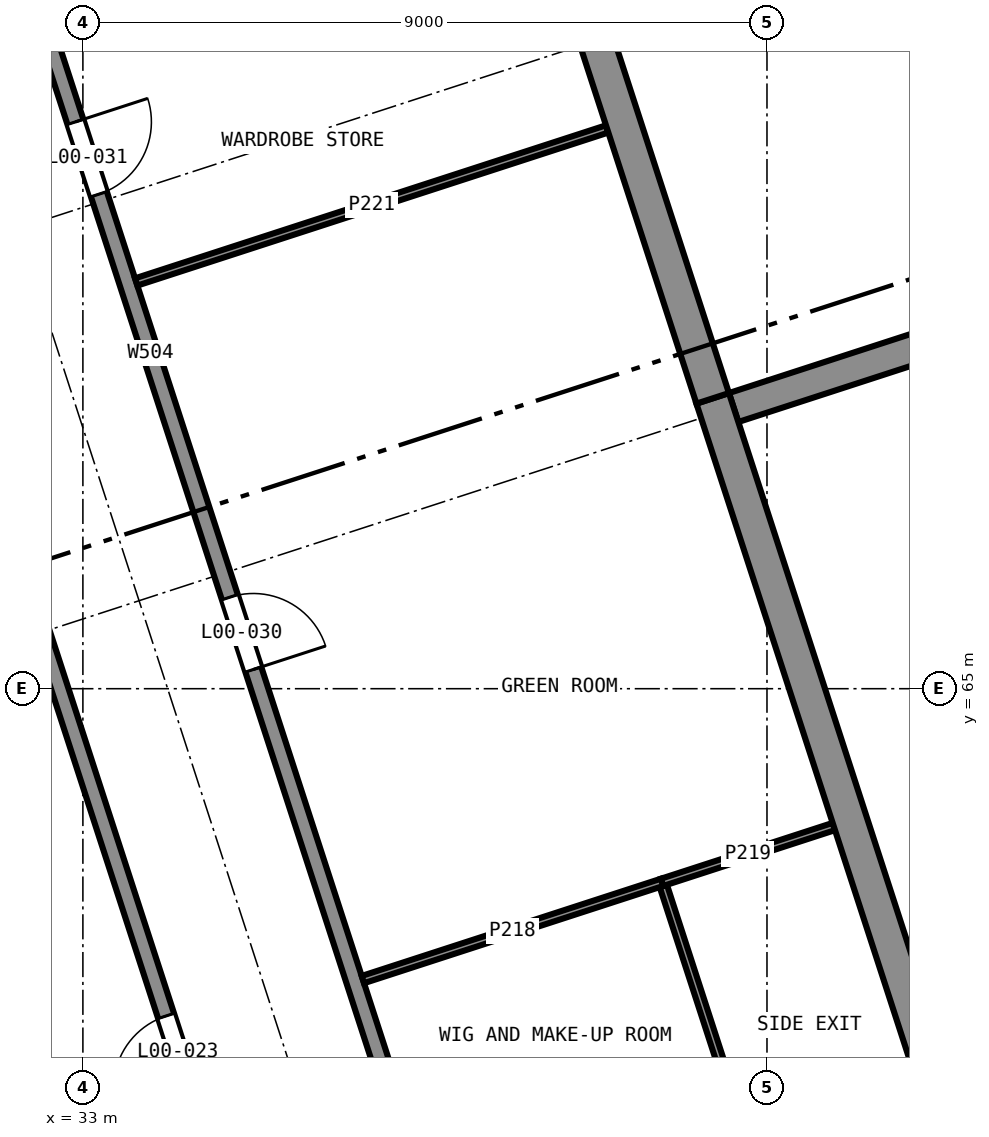
"""IFC4 building model, lengths in metres.
Left out: names, types, materials, properties, quantities, classifications, styles, units other than length and angle.
Written with IfcOpenShell. Run it as: python <this file> out.ifc"""

import sys

from ifc_helpers import new_model, si_unit, direction, frame, frame_2d, origin, place, context, subcontext, project, spatial, rectangle, extrude, element, fill, save


model = new_model("IFC4")
c1 = context("Model", 3, precision=1e-05, world=origin(), true_north=direction((0.0, 1.0)))
c2 = subcontext(c1, "Body", "Model", "MODEL_VIEW")
j1 = project(units=[si_unit("LENGTHUNIT", "METRE"), si_unit("PLANEANGLEUNIT", "RADIAN")], contexts=[c1])
p1 = place(None, origin())
s1 = spatial("IfcSite", under=j1, at=p1, CompositionType="ELEMENT")
p2 = place(p1, origin())
s2 = spatial("IfcBuilding", under=s1, at=p2, CompositionType="ELEMENT")
p3 = place(p2, origin())
s3 = spatial("IfcBuildingStorey", under=s2, at=p3, CompositionType="ELEMENT", Elevation=0.0)
p4 = place(p3, frame((49.93, 42.214, 0.0), z_axis=(0.0, 0.0, 1.0), x_axis=(-0.309016215614, 0.95105676933, 0.0)))
e1 = element("IfcWall", 1, at=p4, inside=s3, PredefinedType="SHEAR", context=c2, shape_type="SweptSolid", body=[
    extrude(rectangle(XDim=27.975, YDim=0.45, at=frame_2d((13.988, 0.0))), origin(), (0.0, 0.0, 1.0), 5.5),
])
p5 = place(p4, frame((13.775, 0.0, 0.0)))
e2 = element("IfcOpeningElement", 2, at=p5, cuts=e1, PredefinedType="OPENING", context=c2, shape_type="SweptSolid", body=[
    extrude(rectangle(XDim=2.0, YDim=2.4, at=frame_2d((1.0, 1.2))), frame((0.0, 0.235, 0.0), z_axis=(0.0, -1.0, 0.0), x_axis=(1.0, 0.0, 0.0)), (0.0, 0.0, 1.0), 0.47),
])
p6 = place(p3, frame((41.286, 68.82, 0.0), z_axis=(0.0, 0.0, 1.0), x_axis=(-0.309008517326, 0.951059270613, 0.0)))
e3 = element("IfcWall", 3, at=p6, inside=s3, PredefinedType="SHEAR", context=c2, shape_type="SweptSolid", body=[
    extrude(rectangle(XDim=19.575, YDim=0.45, at=frame_2d((9.788, 0.0))), origin(), (0.0, 0.0, 1.0), 5.5),
])
p7 = place(p6, frame((7.4, 0.0, 0.0)))
e4 = element("IfcOpeningElement", 4, at=p7, cuts=e3, PredefinedType="OPENING", context=c2, shape_type="SweptSolid", body=[
    extrude(rectangle(XDim=4.8, YDim=4.5, at=frame_2d((2.4, 2.25))), frame((0.0, 0.235, 0.0), z_axis=(0.0, -1.0, 0.0), x_axis=(1.0, 0.0, 0.0)), (0.0, 0.0, 1.0), 0.47),
])
p8 = place(p3, frame((41.562, 68.699, 0.0), z_axis=(0.0, 0.0, 1.0), x_axis=(0.95105806443, 0.309012229664, 0.0)))
e5 = element("IfcWall", 5, at=p8, inside=s3, PredefinedType="SHEAR", context=c2, shape_type="SweptSolid", body=[
    extrude(rectangle(XDim=7.775, YDim=0.4, at=frame_2d((3.888, 0.0))), origin(), (0.0, 0.0, 1.0), 5.5),
])
p9 = place(p3, frame((33.501, 41.003, 0.0), z_axis=(0.0, 0.0, 1.0), x_axis=(-0.309017194826, 0.951056451165, 0.0)))
e6 = element("IfcWall", 6, at=p9, inside=s3, PredefinedType="SOLIDWALL", context=c2, shape_type="SweptSolid", body=[
    extrude(rectangle(XDim=53.7, YDim=0.3, at=frame_2d((26.85, 0.0))), origin(), (0.0, 0.0, 1.0), 5.5),
])
p10 = place(p9, frame((31.55, 0.0, 0.9)))
e7 = element("IfcOpeningElement", 7, at=p10, cuts=e6, PredefinedType="OPENING", context=c2, shape_type="SweptSolid", body=[
    extrude(rectangle(XDim=3.6, YDim=2.1, at=frame_2d((1.8, 1.05))), frame((0.0, 0.16, 0.0), z_axis=(0.0, -1.0, 0.0), x_axis=(1.0, 0.0, 0.0)), (0.0, 0.0, 1.0), 0.32),
])
p11 = place(p9, frame((3.0, 0.0, 0.0)))
e8 = element("IfcOpeningElement", 8, at=p11, cuts=e6, PredefinedType="OPENING", context=c2, shape_type="SweptSolid", body=[
    extrude(rectangle(XDim=1.1, YDim=2.1, at=frame_2d((0.55, 1.05))), frame((0.0, 0.16, 0.0), z_axis=(0.0, -1.0, 0.0), x_axis=(1.0, 0.0, 0.0)), (0.0, 0.0, 1.0), 0.32),
])
p12 = place(p9, frame((12.6, 0.0, 0.0)))
e9 = element("IfcOpeningElement", 9, at=p12, cuts=e6, PredefinedType="OPENING", context=c2, shape_type="SweptSolid", body=[
    extrude(rectangle(XDim=4.5, YDim=4.5, at=frame_2d((2.25, 2.25))), frame((0.0, 0.16, 0.0), z_axis=(0.0, -1.0, 0.0), x_axis=(1.0, 0.0, 0.0)), (0.0, 0.0, 1.0), 0.32),
])
p13 = place(p9, frame((19.1, 0.0, 0.0)))
e10 = element("IfcOpeningElement", 10, at=p13, cuts=e6, PredefinedType="OPENING", context=c2, shape_type="SweptSolid", body=[
    extrude(rectangle(XDim=4.5, YDim=4.5, at=frame_2d((2.25, 2.25))), frame((0.0, 0.16, 0.0), z_axis=(0.0, -1.0, 0.0), x_axis=(1.0, 0.0, 0.0)), (0.0, 0.0, 1.0), 0.32),
])
p14 = place(p3, frame((37.956, 48.812, 0.0), z_axis=(0.0, 0.0, 1.0), x_axis=(-0.30901736393, 0.951056396219, 0.0)))
e11 = element("IfcWall", 11, at=p14, inside=s3, PredefinedType="SOLIDWALL", context=c2, shape_type="SweptSolid", body=[
    extrude(rectangle(XDim=41.7, YDim=0.22, at=frame_2d((20.85, 0.0))), origin(), (0.0, 0.0, 1.0), 5.2),
])
p15 = place(p14, frame((2.009, 0.0, 0.0)))
e12 = element("IfcOpeningElement", 12, at=p15, cuts=e11, PredefinedType="OPENING", context=c2, shape_type="SweptSolid", body=[
    extrude(rectangle(XDim=1.0, YDim=2.1, at=frame_2d((0.5, 1.05))), frame((0.0, 0.12, 0.0), z_axis=(0.0, -1.0, 0.0), x_axis=(1.0, 0.0, 0.0)), (0.0, 0.0, 1.0), 0.24),
])
p16 = place(p14, frame((11.495, 0.0, 0.0)))
e13 = element("IfcOpeningElement", 13, at=p16, cuts=e11, PredefinedType="OPENING", context=c2, shape_type="SweptSolid", body=[
    extrude(rectangle(XDim=1.0, YDim=2.1, at=frame_2d((0.5, 1.05))), frame((0.0, 0.12, 0.0), z_axis=(0.0, -1.0, 0.0), x_axis=(1.0, 0.0, 0.0)), (0.0, 0.0, 1.0), 0.24),
])
p17 = place(p14, frame((21.7, 0.0, 0.0)))
e14 = element("IfcOpeningElement", 14, at=p17, cuts=e11, PredefinedType="OPENING", context=c2, shape_type="SweptSolid", body=[
    extrude(rectangle(XDim=1.2, YDim=2.1, at=frame_2d((0.6, 1.05))), frame((0.0, 0.12, 0.0), z_axis=(0.0, -1.0, 0.0), x_axis=(1.0, 0.0, 0.0)), (0.0, 0.0, 1.0), 0.24),
])
p18 = place(p14, frame((26.7, 0.0, 0.0)))
e15 = element("IfcOpeningElement", 15, at=p18, cuts=e11, PredefinedType="OPENING", context=c2, shape_type="SweptSolid", body=[
    extrude(rectangle(XDim=1.2, YDim=2.1, at=frame_2d((0.6, 1.05))), frame((0.0, 0.12, 0.0), z_axis=(0.0, -1.0, 0.0), x_axis=(1.0, 0.0, 0.0)), (0.0, 0.0, 1.0), 0.24),
])
p19 = place(p14, frame((31.739, 0.0, 0.0)))
e16 = element("IfcOpeningElement", 16, at=p19, cuts=e11, PredefinedType="OPENING", context=c2, shape_type="SweptSolid", body=[
    extrude(rectangle(XDim=1.2, YDim=2.1, at=frame_2d((0.6, 1.05))), frame((0.0, 0.12, 0.0), z_axis=(0.0, -1.0, 0.0), x_axis=(1.0, 0.0, 0.0)), (0.0, 0.0, 1.0), 0.24),
])
p20 = place(p3, frame((40.333, 49.584, 0.0), z_axis=(0.0, 0.0, 1.0), x_axis=(-0.309015643281, 0.951056955291, 0.0)))
e17 = element("IfcWall", 17, at=p20, inside=s3, PredefinedType="SOLIDWALL", context=c2, shape_type="SweptSolid", body=[
    extrude(rectangle(XDim=41.7, YDim=0.22, at=frame_2d((20.85, 0.0))), origin(), (0.0, 0.0, 1.0), 5.2),
])
p21 = place(p20, frame((1.9, 0.0, 0.0)))
e18 = element("IfcOpeningElement", 18, at=p21, cuts=e17, PredefinedType="OPENING", context=c2, shape_type="SweptSolid", body=[
    extrude(rectangle(XDim=1.2, YDim=2.1, at=frame_2d((0.6, 1.05))), frame((0.0, 0.12, 0.0), z_axis=(0.0, -1.0, 0.0), x_axis=(1.0, 0.0, 0.0)), (0.0, 0.0, 1.0), 0.24),
])
p22 = place(p20, frame((8.185, 0.0, 0.0)))
e19 = element("IfcOpeningElement", 19, at=p22, cuts=e17, PredefinedType="OPENING", context=c2, shape_type="SweptSolid", body=[
    extrude(rectangle(XDim=1.2, YDim=2.1, at=frame_2d((0.6, 1.05))), frame((0.0, 0.12, 0.0), z_axis=(0.0, -1.0, 0.0), x_axis=(1.0, 0.0, 0.0)), (0.0, 0.0, 1.0), 0.24),
])
p23 = place(p20, frame((16.475, 0.0, 0.0)))
e20 = element("IfcOpeningElement", 20, at=p23, cuts=e17, PredefinedType="OPENING", context=c2, shape_type="SweptSolid", body=[
    extrude(rectangle(XDim=1.0, YDim=2.1, at=frame_2d((0.5, 1.05))), frame((0.0, 0.12, 0.0), z_axis=(0.0, -1.0, 0.0), x_axis=(1.0, 0.0, 0.0)), (0.0, 0.0, 1.0), 0.24),
])
p24 = place(p20, frame((23.05, 0.0, 0.0)))
e21 = element("IfcOpeningElement", 21, at=p24, cuts=e17, PredefinedType="OPENING", context=c2, shape_type="SweptSolid", body=[
    extrude(rectangle(XDim=1.0, YDim=2.1, at=frame_2d((0.5, 1.05))), frame((0.0, 0.12, 0.0), z_axis=(0.0, -1.0, 0.0), x_axis=(1.0, 0.0, 0.0)), (0.0, 0.0, 1.0), 0.24),
])
p25 = place(p20, frame((27.3, 0.0, 0.0)))
e22 = element("IfcOpeningElement", 22, at=p25, cuts=e17, PredefinedType="OPENING", context=c2, shape_type="SweptSolid", body=[
    extrude(rectangle(XDim=1.0, YDim=2.1, at=frame_2d((0.5, 1.05))), frame((0.0, 0.12, 0.0), z_axis=(0.0, -1.0, 0.0), x_axis=(1.0, 0.0, 0.0)), (0.0, 0.0, 1.0), 0.24),
])
p26 = place(p20, frame((32.761, 0.0, 0.0)))
e23 = element("IfcOpeningElement", 23, at=p26, cuts=e17, PredefinedType="OPENING", context=c2, shape_type="SweptSolid", body=[
    extrude(rectangle(XDim=1.0, YDim=2.1, at=frame_2d((0.5, 1.05))), frame((0.0, 0.12, 0.0), z_axis=(0.0, -1.0, 0.0), x_axis=(1.0, 0.0, 0.0)), (0.0, 0.0, 1.0), 0.24),
])
p27 = place(p3, frame((36.683, 61.173, 0.0), z_axis=(0.0, 0.0, 1.0), x_axis=(0.95105616864, 0.309018064344, 0.0)))
e24 = element("IfcWall", 24, at=p27, inside=s3, PredefinedType="PARTITIONING", context=c2, shape_type="SweptSolid", body=[
    extrude(rectangle(XDim=4.14, YDim=0.1, at=frame_2d((2.07, 0.0))), origin(), (0.0, 0.0, 1.0), 5.2),
])
p28 = place(p3, frame((40.621, 62.453, 0.0), z_axis=(0.0, 0.0, 1.0), x_axis=(0.951061260164, 0.309002393867, 0.0)))
e25 = element("IfcWall", 25, at=p28, inside=s3, PredefinedType="PARTITIONING", context=c2, shape_type="SweptSolid", body=[
    extrude(rectangle(XDim=2.375, YDim=0.1, at=frame_2d((1.188, 0.0))), origin(), (0.0, 0.0, 1.0), 5.2),
])
p29 = place(p3, frame((33.701, 70.351, 0.0), z_axis=(0.0, 0.0, 1.0), x_axis=(0.951058024796, 0.309012351648, 0.0)))
e26 = element("IfcWall", 26, at=p29, inside=s3, PredefinedType="PARTITIONING", context=c2, shape_type="SweptSolid", body=[
    extrude(rectangle(XDim=6.515, YDim=0.1, at=frame_2d((3.257, 0.0))), origin(), (0.0, 0.0, 1.0), 5.2),
])
p30 = place(p3, frame((44.341, 51.002, 0.0), z_axis=(0.0, 0.0, 1.0), x_axis=(-0.309016547708, 0.951056661426, 0.0)))
e27 = element("IfcWall", 27, at=p30, inside=s3, PredefinedType="PARTITIONING", context=c2, shape_type="SweptSolid", body=[
    extrude(rectangle(XDim=11.99, YDim=0.1, at=frame_2d((5.995, 0.0))), origin(), (0.0, 0.0, 1.0), 5.2),
])
p31 = place(p16, origin())
e28 = element("IfcDoor", 28, at=p31, inside=s3, OperationType="SINGLE_SWING_RIGHT", PredefinedType="DOOR", context=c2, shape_type="SweptSolid", body=[
    extrude(rectangle(XDim=1.0, YDim=2.1, at=frame_2d((0.5, 1.05))), frame((0.0, 0.025, 0.0), z_axis=(0.0, -1.0, 0.0), x_axis=(1.0, 0.0, 0.0)), (0.0, 0.0, 1.0), 0.05),
])
fill(e13, e28)
p32 = place(p23, frame((1.0, 0.0, 0.0), z_axis=(0.0, 0.0, 1.0), x_axis=(-1.0, 0.0, 0.0)))
e29 = element("IfcDoor", 29, at=p32, inside=s3, OperationType="SINGLE_SWING_LEFT", PredefinedType="DOOR", context=c2, shape_type="SweptSolid", body=[
    extrude(rectangle(XDim=1.0, YDim=2.1, at=frame_2d((0.5, 1.05))), frame((0.0, 0.025, 0.0), z_axis=(0.0, -1.0, 0.0), x_axis=(1.0, 0.0, 0.0)), (0.0, 0.0, 1.0), 0.05),
])
fill(e20, e29)
p33 = place(p24, frame((1.0, 0.0, 0.0), z_axis=(0.0, 0.0, 1.0), x_axis=(-1.0, 0.0, 0.0)))
e30 = element("IfcDoor", 30, at=p33, inside=s3, OperationType="SINGLE_SWING_RIGHT", PredefinedType="DOOR", context=c2, shape_type="SweptSolid", body=[
    extrude(rectangle(XDim=1.0, YDim=2.1, at=frame_2d((0.5, 1.05))), frame((0.0, 0.025, 0.0), z_axis=(0.0, -1.0, 0.0), x_axis=(1.0, 0.0, 0.0)), (0.0, 0.0, 1.0), 0.05),
])
fill(e21, e30)
save(model, sys.argv[1])
